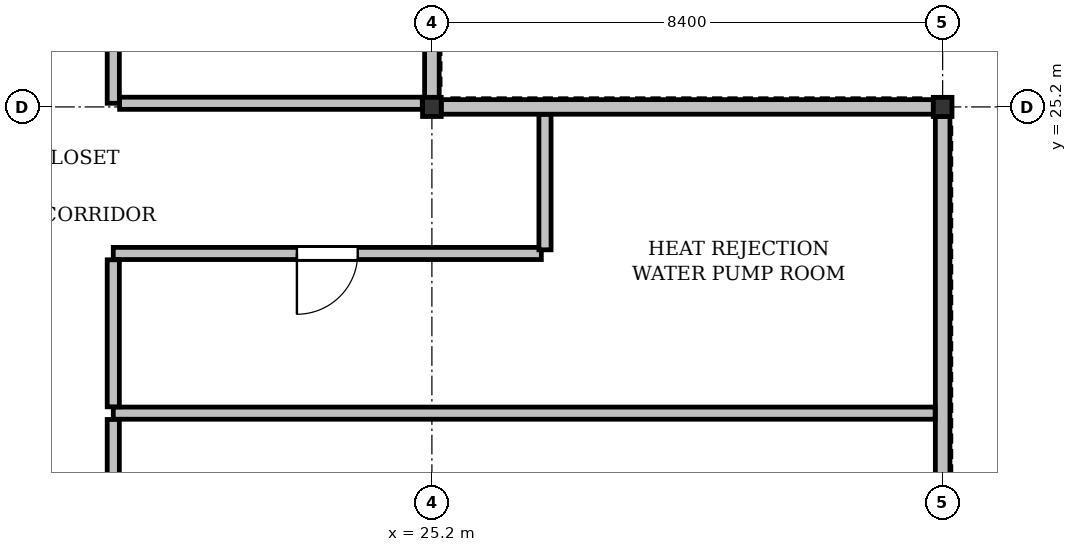
"""IFC4 building model, lengths in metres.
Left out: names, types, materials, properties, quantities, classifications, styles, units other than length and angle.
Written with IfcOpenShell. Run it as: python <this file> out.ifc"""

import sys

from ifc_helpers import new_model, si_unit, direction, frame, frame_2d, origin, origin_2d, place, context, subcontext, project, spatial, rectangle, i_section, extrude, element, fill, save


model = new_model("IFC4")
c1 = context("Model", 3, precision=1e-05, world=origin(), true_north=direction((0.0, 1.0)))
c2 = subcontext(c1, "Body", "Model", "MODEL_VIEW")
j1 = project(units=[si_unit("LENGTHUNIT", "METRE"), si_unit("PLANEANGLEUNIT", "RADIAN")], contexts=[c1])
p1 = place(None, origin())
s1 = spatial("IfcSite", under=j1, at=p1, CompositionType="ELEMENT")
p2 = place(p1, origin())
s2 = spatial("IfcBuilding", under=s1, at=p2, CompositionType="ELEMENT")
p3 = place(p2, frame((0.0, 0.0, 322.2)))
s3 = spatial("IfcBuildingStorey", under=s2, at=p3, CompositionType="ELEMENT", Elevation=322.2)
for number, where, z_axis, x_axis in (
    (1, (25.2, 25.2, 0.0), (0.0, 0.0, 1.0), (1.0, 0.0, 0.0)),
    (2, (33.6, 25.2, 0.0), (0.0, 0.0, 1.0), (1.0, 0.0, 0.0)),
):
    element("IfcColumn", number, at=place(p3, frame(where, z_axis=z_axis, x_axis=x_axis)), inside=s3, PredefinedType="COLUMN", context=c2, shape_type="SweptSolid", body=[
        extrude(i_section(OverallWidth=0.307, OverallDepth=0.315, WebThickness=0.012, FlangeThickness=0.019, FilletRadius=0.017, at=origin_2d()), origin(), (0.0, 0.0, 1.0), 4.8),
    ])
p4 = place(p3, frame((25.2, 33.442, 0.0), z_axis=(0.0, 0.0, 1.0), x_axis=(0.0, -1.0, 0.0)))
e3 = element("IfcWall", 3, at=p4, inside=s3, PredefinedType="STANDARD", context=c2, shape_type="SweptSolid", body=[
    extrude(rectangle(XDim=8.085, YDim=0.24, at=frame_2d((4.042, 0.0))), origin(), (0.0, 0.0, 1.0), 4.243),
])
p5 = place(p3, frame((25.354, 25.2, 0.0), z_axis=(0.0, 0.0, 1.0), x_axis=(1.0, 0.0, 0.0)))
e4 = element("IfcWall", 4, at=p5, inside=s3, PredefinedType="STANDARD", context=c2, shape_type="SweptSolid", body=[
    extrude(rectangle(XDim=8.093, YDim=0.24, at=frame_2d((4.046, 0.0))), origin(), (0.0, 0.0, 1.0), 4.243),
])
p6 = place(p3, frame((33.6, 25.042, 0.0), z_axis=(0.0, 0.0, 1.0), x_axis=(0.0, -1.0, 0.0)))
e5 = element("IfcWall", 5, at=p6, inside=s3, PredefinedType="STANDARD", context=c2, shape_type="SweptSolid", body=[
    extrude(rectangle(XDim=7.893, YDim=0.24, at=frame_2d((3.946, 0.0))), origin(), (0.0, 0.0, 1.0), 4.243),
])
p7 = place(p3, frame((33.476, 20.164, 0.0), z_axis=(0.0, 0.0, 1.0), x_axis=(-1.0, 0.0, 0.0)))
e6 = element("IfcWall", 6, at=p7, inside=s3, PredefinedType="PARTITIONING", context=c2, shape_type="SweptSolid", body=[
    extrude(rectangle(XDim=13.516, YDim=0.2, at=frame_2d((6.758, 0.0))), origin(), (0.0, 0.0, 1.0), 4.143),
])
p8 = place(p3, frame((19.96, 20.06, 0.0), z_axis=(0.0, 0.0, 1.0), x_axis=(0.0, -1.0, 0.0)))
e7 = element("IfcWall", 7, at=p8, inside=s3, PredefinedType="PARTITIONING", context=c2, shape_type="SweptSolid", body=[
    extrude(rectangle(XDim=3.035, YDim=0.2, at=frame_2d((1.518, 0.0))), origin(), (0.0, 0.0, 1.0), 4.45),
])
p9 = place(p3, frame((19.96, 37.4, 0.0), z_axis=(0.0, 0.0, 1.0), x_axis=(0.0, -1.0, 0.0)))
e8 = element("IfcWall", 8, at=p9, inside=s3, PredefinedType="PARTITIONING", context=c2, shape_type="SweptSolid", body=[
    extrude(rectangle(XDim=12.14, YDim=0.2, at=frame_2d((6.07, 0.0))), origin(), (0.0, 0.0, 1.0), 4.091),
])
p10 = place(p9, frame((5.57, 0.0, 0.0)))
e9 = element("IfcOpeningElement", 9, at=p10, cuts=e8, PredefinedType="OPENING", context=c2, shape_type="SweptSolid", body=[
    extrude(rectangle(XDim=1.0, YDim=2.15, at=frame_2d((0.5, 1.075))), frame((0.0, 0.11, 0.0), z_axis=(0.0, -1.0, 0.0), x_axis=(1.0, 0.0, 0.0)), (0.0, 0.0, 1.0), 0.22),
])
p11 = place(p3, frame((20.064, 25.26, 0.0), z_axis=(0.0, 0.0, 1.0), x_axis=(1.0, 0.0, 0.0)))
e10 = element("IfcWall", 10, at=p11, inside=s3, PredefinedType="PARTITIONING", context=c2, shape_type="SweptSolid", body=[
    extrude(rectangle(XDim=4.978, YDim=0.2, at=frame_2d((2.489, 0.0))), origin(), (0.0, 0.0, 1.0), 4.091),
])
p12 = place(p3, frame((27.0, 22.79, 0.0), z_axis=(0.0, 0.0, 1.0), x_axis=(-1.0, 0.0, 0.0)))
e11 = element("IfcWall", 11, at=p12, inside=s3, PredefinedType="PARTITIONING", context=c2, shape_type="SweptSolid", body=[
    extrude(rectangle(XDim=7.04, YDim=0.2, at=frame_2d((3.52, 0.0))), origin(), (0.0, 0.0, 1.0), 4.143),
])
p13 = place(p12, frame((3.02, 0.0, 0.0)))
e12 = element("IfcOpeningElement", 12, at=p13, cuts=e11, PredefinedType="OPENING", context=c2, shape_type="SweptSolid", body=[
    extrude(rectangle(XDim=1.0, YDim=2.15, at=frame_2d((0.5, 1.075))), frame((0.0, 0.11, 0.0), z_axis=(0.0, -1.0, 0.0), x_axis=(1.0, 0.0, 0.0)), (0.0, 0.0, 1.0), 0.22),
])
p14 = place(p3, frame((19.96, 22.686, 0.0), z_axis=(0.0, 0.0, 1.0), x_axis=(0.0, -1.0, 0.0)))
e13 = element("IfcWall", 13, at=p14, inside=s3, PredefinedType="PARTITIONING", context=c2, shape_type="SweptSolid", body=[
    extrude(rectangle(XDim=2.418, YDim=0.2, at=frame_2d((1.209, 0.0))), origin(), (0.0, 0.0, 1.0), 4.45),
])
p15 = place(p3, frame((27.06, 25.076, 0.0), z_axis=(0.0, 0.0, 1.0), x_axis=(0.0, -1.0, 0.0)))
e14 = element("IfcWall", 14, at=p15, inside=s3, PredefinedType="PARTITIONING", context=c2, shape_type="SweptSolid", body=[
    extrude(rectangle(XDim=2.226, YDim=0.2, at=frame_2d((1.113, 0.0))), origin(), (0.0, 0.0, 1.0), 4.45),
])
p16 = place(p13, origin())
e15 = element("IfcDoor", 15, at=p16, inside=s3, OperationType="SINGLE_SWING_RIGHT", PredefinedType="DOOR", context=c2, shape_type="SweptSolid", body=[
    extrude(rectangle(XDim=1.0, YDim=2.15, at=frame_2d((0.5, 1.075))), frame((0.0, 0.025, 0.0), z_axis=(0.0, -1.0, 0.0), x_axis=(1.0, 0.0, 0.0)), (0.0, 0.0, 1.0), 0.05),
])
fill(e12, e15)
save(model, sys.argv[1])
